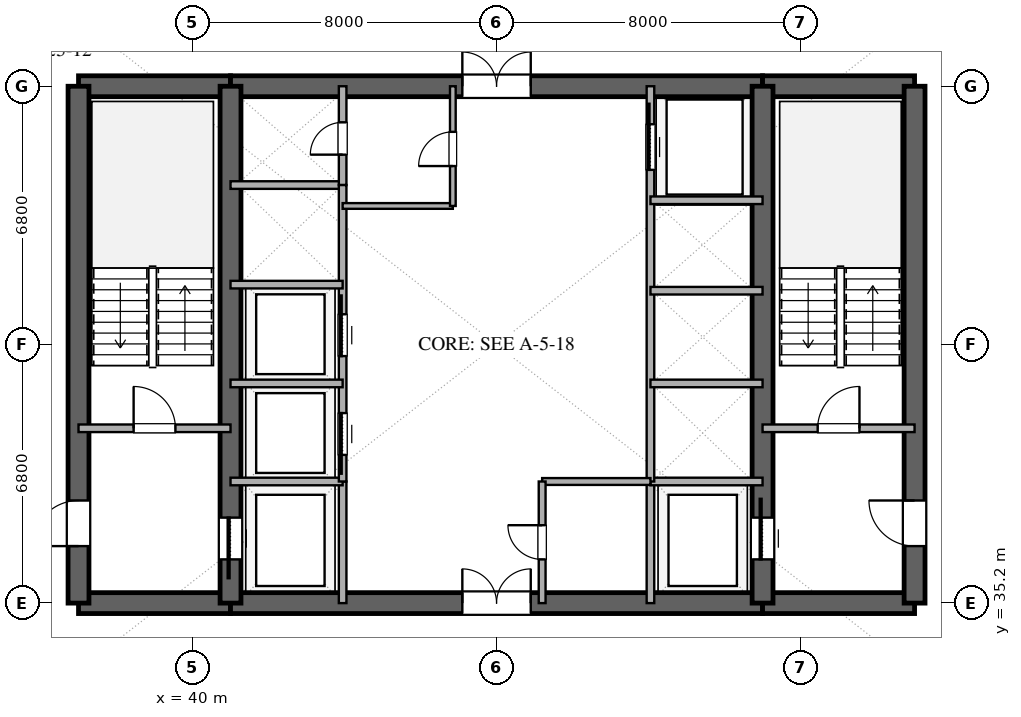
"""IFC4 building model, lengths in metres.
Left out: names, types, materials, properties, quantities, classifications, styles, units other than length and angle.
Written with IfcOpenShell. Run it as: python <this file> out.ifc"""

import sys

from ifc_helpers import new_model, si_unit, direction, frame, frame_2d, origin, place, context, subcontext, project, spatial, rectangle, extrude, element, fill, save


model = new_model("IFC4")
c1 = context("Model", 3, precision=1e-05, world=origin(), true_north=direction((0.0, 1.0)))
c2 = subcontext(c1, "Body", "Model", "MODEL_VIEW")
j1 = project(units=[si_unit("LENGTHUNIT", "METRE"), si_unit("PLANEANGLEUNIT", "RADIAN")], contexts=[c1])
p1 = place(None, origin())
s1 = spatial("IfcSite", under=j1, at=p1, CompositionType="ELEMENT")
p2 = place(p1, origin())
s2 = spatial("IfcBuilding", under=s1, at=p2, CompositionType="ELEMENT")
p3 = place(p2, frame((0.0, 0.0, 102.0)))
s3 = spatial("IfcBuildingStorey", under=s2, at=p3, CompositionType="ELEMENT", Elevation=102.0)
p4 = place(p3, frame((37.0, 35.2, 0.0), z_axis=(0.0, 0.0, 1.0), x_axis=(1.0, 0.0, 0.0)))
e1 = element("IfcWall", 1, at=p4, inside=s3, PredefinedType="SHEAR", context=c2, shape_type="SweptSolid", body=[
    extrude(rectangle(XDim=4.0, YDim=0.55, at=frame_2d((2.0, 0.0))), origin(), (0.0, 0.0, 1.0), 3.38),
])
p5 = place(p3, frame((41.0, 35.2, 0.0), z_axis=(0.0, 0.0, 1.0), x_axis=(1.0, 0.0, 0.0)))
e2 = element("IfcWall", 2, at=p5, inside=s3, PredefinedType="SHEAR", context=c2, shape_type="SweptSolid", body=[
    extrude(rectangle(XDim=14.0, YDim=0.55, at=frame_2d((7.0, 0.0))), origin(), (0.0, 0.0, 1.0), 3.38),
])
p6 = place(p5, frame((6.1, 0.0, 0.0)))
e3 = element("IfcOpeningElement", 3, at=p6, cuts=e2, PredefinedType="OPENING", context=c2, shape_type="SweptSolid", body=[
    extrude(rectangle(XDim=1.8, YDim=2.25, at=frame_2d((0.9, 1.125))), frame((0.0, 0.285, 0.0), z_axis=(0.0, -1.0, 0.0), x_axis=(1.0, 0.0, 0.0)), (0.0, 0.0, 1.0), 0.57),
])
for number, where, z_axis, x_axis in (
    (4, (55.0, 35.2, 0.0), (0.0, 0.0, 1.0), (1.0, 0.0, 0.0)),
    (5, (37.0, 48.8, 0.0), (0.0, 0.0, 1.0), (1.0, 0.0, 0.0)),
):
    element("IfcWall", number, at=place(p3, frame(where, z_axis=z_axis, x_axis=x_axis)), inside=s3, PredefinedType="SHEAR", context=c2, shape_type="SweptSolid", body=[
        extrude(rectangle(XDim=4.0, YDim=0.55, at=frame_2d((2.0, 0.0))), origin(), (0.0, 0.0, 1.0), 3.38),
    ])
p7 = place(p3, frame((41.0, 48.8, 0.0), z_axis=(0.0, 0.0, 1.0), x_axis=(1.0, 0.0, 0.0)))
e6 = element("IfcWall", 6, at=p7, inside=s3, PredefinedType="SHEAR", context=c2, shape_type="SweptSolid", body=[
    extrude(rectangle(XDim=14.0, YDim=0.55, at=frame_2d((7.0, 0.0))), origin(), (0.0, 0.0, 1.0), 3.38),
])
p8 = place(p7, frame((6.1, 0.0, 0.0)))
e7 = element("IfcOpeningElement", 7, at=p8, cuts=e6, PredefinedType="OPENING", context=c2, shape_type="SweptSolid", body=[
    extrude(rectangle(XDim=1.8, YDim=2.25, at=frame_2d((0.9, 1.125))), frame((0.0, 0.285, 0.0), z_axis=(0.0, -1.0, 0.0), x_axis=(1.0, 0.0, 0.0)), (0.0, 0.0, 1.0), 0.57),
])
p9 = place(p3, frame((55.0, 48.8, 0.0), z_axis=(0.0, 0.0, 1.0), x_axis=(1.0, 0.0, 0.0)))
e8 = element("IfcWall", 8, at=p9, inside=s3, PredefinedType="SHEAR", context=c2, shape_type="SweptSolid", body=[
    extrude(rectangle(XDim=4.0, YDim=0.55, at=frame_2d((2.0, 0.0))), origin(), (0.0, 0.0, 1.0), 3.38),
])
p10 = place(p3, frame((37.0, 35.2, 0.0), z_axis=(0.0, 0.0, 1.0), x_axis=(0.0, 1.0, 0.0)))
e9 = element("IfcWall", 9, at=p10, inside=s3, PredefinedType="SHEAR", context=c2, shape_type="SweptSolid", body=[
    extrude(rectangle(XDim=13.6, YDim=0.55, at=frame_2d((6.8, 0.0))), origin(), (0.0, 0.0, 1.0), 3.38),
])
p11 = place(p10, frame((1.5, 0.0, 0.0)))
e10 = element("IfcOpeningElement", 10, at=p11, cuts=e9, PredefinedType="OPENING", context=c2, shape_type="SweptSolid", body=[
    extrude(rectangle(XDim=1.2, YDim=2.15, at=frame_2d((0.6, 1.075))), frame((0.0, 0.285, 0.0), z_axis=(0.0, -1.0, 0.0), x_axis=(1.0, 0.0, 0.0)), (0.0, 0.0, 1.0), 0.57),
])
p12 = place(p3, frame((59.0, 35.2, 0.0), z_axis=(0.0, 0.0, 1.0), x_axis=(0.0, 1.0, 0.0)))
e11 = element("IfcWall", 11, at=p12, inside=s3, PredefinedType="SHEAR", context=c2, shape_type="SweptSolid", body=[
    extrude(rectangle(XDim=13.6, YDim=0.55, at=frame_2d((6.8, 0.0))), origin(), (0.0, 0.0, 1.0), 3.38),
])
p13 = place(p12, frame((1.5, 0.0, 0.0)))
e12 = element("IfcOpeningElement", 12, at=p13, cuts=e11, PredefinedType="OPENING", context=c2, shape_type="SweptSolid", body=[
    extrude(rectangle(XDim=1.2, YDim=2.15, at=frame_2d((0.6, 1.075))), frame((0.0, 0.285, 0.0), z_axis=(0.0, -1.0, 0.0), x_axis=(1.0, 0.0, 0.0)), (0.0, 0.0, 1.0), 0.57),
])
p14 = place(p3, frame((41.0, 35.2, 0.0), z_axis=(0.0, 0.0, 1.0), x_axis=(0.0, 1.0, 0.0)))
e13 = element("IfcWall", 13, at=p14, inside=s3, PredefinedType="SHEAR", context=c2, shape_type="SweptSolid", body=[
    extrude(rectangle(XDim=13.6, YDim=0.55, at=frame_2d((6.8, 0.0))), origin(), (0.0, 0.0, 1.0), 3.38),
])
p15 = place(p14, frame((1.15, 0.0, 0.0)))
e14 = element("IfcOpeningElement", 14, at=p15, cuts=e13, PredefinedType="OPENING", context=c2, shape_type="SweptSolid", body=[
    extrude(rectangle(XDim=1.1, YDim=2.2, at=frame_2d((0.55, 1.1))), frame((0.0, 0.285, 0.0), z_axis=(0.0, -1.0, 0.0), x_axis=(1.0, 0.0, 0.0)), (0.0, 0.0, 1.0), 0.57),
])
p16 = place(p3, frame((55.0, 35.2, 0.0), z_axis=(0.0, 0.0, 1.0), x_axis=(0.0, 1.0, 0.0)))
e15 = element("IfcWall", 15, at=p16, inside=s3, PredefinedType="SHEAR", context=c2, shape_type="SweptSolid", body=[
    extrude(rectangle(XDim=13.6, YDim=0.55, at=frame_2d((6.8, 0.0))), origin(), (0.0, 0.0, 1.0), 3.38),
])
p17 = place(p16, frame((1.15, 0.0, 0.0)))
e16 = element("IfcOpeningElement", 16, at=p17, cuts=e15, PredefinedType="OPENING", context=c2, shape_type="SweptSolid", body=[
    extrude(rectangle(XDim=1.1, YDim=2.2, at=frame_2d((0.55, 1.1))), frame((0.0, 0.285, 0.0), z_axis=(0.0, -1.0, 0.0), x_axis=(1.0, 0.0, 0.0)), (0.0, 0.0, 1.0), 0.57),
])
p18 = place(p3, frame((37.0, 39.8, 0.0), z_axis=(0.0, 0.0, 1.0), x_axis=(1.0, 0.0, 0.0)))
e17 = element("IfcWall", 17, at=p18, inside=s3, PredefinedType="SOLIDWALL", context=c2, shape_type="SweptSolid", body=[
    extrude(rectangle(XDim=4.0, YDim=0.2, at=frame_2d((2.0, 0.0))), origin(), (0.0, 0.0, 1.0), 2.74),
])
p19 = place(p18, frame((1.45, 0.0, 0.0)))
e18 = element("IfcOpeningElement", 18, at=p19, cuts=e17, PredefinedType="OPENING", context=c2, shape_type="SweptSolid", body=[
    extrude(rectangle(XDim=1.1, YDim=2.15, at=frame_2d((0.55, 1.075))), frame((0.0, 0.11, 0.0), z_axis=(0.0, -1.0, 0.0), x_axis=(1.0, 0.0, 0.0)), (0.0, 0.0, 1.0), 0.22),
])
p20 = place(p3, frame((55.0, 39.8, 0.0), z_axis=(0.0, 0.0, 1.0), x_axis=(1.0, 0.0, 0.0)))
e19 = element("IfcWall", 19, at=p20, inside=s3, PredefinedType="SOLIDWALL", context=c2, shape_type="SweptSolid", body=[
    extrude(rectangle(XDim=4.0, YDim=0.2, at=frame_2d((2.0, 0.0))), origin(), (0.0, 0.0, 1.0), 2.74),
])
p21 = place(p20, frame((1.45, 0.0, 0.0)))
e20 = element("IfcOpeningElement", 20, at=p21, cuts=e19, PredefinedType="OPENING", context=c2, shape_type="SweptSolid", body=[
    extrude(rectangle(XDim=1.1, YDim=2.15, at=frame_2d((0.55, 1.075))), frame((0.0, 0.11, 0.0), z_axis=(0.0, -1.0, 0.0), x_axis=(1.0, 0.0, 0.0)), (0.0, 0.0, 1.0), 0.22),
])
p22 = place(p3, frame((43.95, 35.2, 0.0), z_axis=(0.0, 0.0, 1.0), x_axis=(0.0, 1.0, 0.0)))
e21 = element("IfcWall", 21, at=p22, inside=s3, PredefinedType="SOLIDWALL", context=c2, shape_type="SweptSolid", body=[
    extrude(rectangle(XDim=3.2, YDim=0.2, at=frame_2d((1.6, 0.0))), origin(), (0.0, 0.0, 1.0), 2.74),
])
p23 = place(p3, frame((41.0, 38.4, 0.0), z_axis=(0.0, 0.0, 1.0), x_axis=(1.0, 0.0, 0.0)))
e22 = element("IfcWall", 22, at=p23, inside=s3, PredefinedType="SOLIDWALL", context=c2, shape_type="SweptSolid", body=[
    extrude(rectangle(XDim=2.95, YDim=0.2, at=frame_2d((1.475, 0.0))), origin(), (0.0, 0.0, 1.0), 2.74),
])
p24 = place(p3, frame((52.05, 35.2, 0.0), z_axis=(0.0, 0.0, 1.0), x_axis=(0.0, 1.0, 0.0)))
e23 = element("IfcWall", 23, at=p24, inside=s3, PredefinedType="SOLIDWALL", context=c2, shape_type="SweptSolid", body=[
    extrude(rectangle(XDim=3.2, YDim=0.2, at=frame_2d((1.6, 0.0))), origin(), (0.0, 0.0, 1.0), 2.74),
])
for number, where, z_axis, x_axis in (
    (24, (52.05, 38.4, 0.0), (0.0, 0.0, 1.0), (1.0, 0.0, 0.0)),
    (25, (41.0, 46.2, 0.0), (0.0, 0.0, 1.0), (1.0, 0.0, 0.0)),
):
    element("IfcWall", number, at=place(p3, frame(where, z_axis=z_axis, x_axis=x_axis)), inside=s3, PredefinedType="SOLIDWALL", context=c2, shape_type="SweptSolid", body=[
        extrude(rectangle(XDim=2.95, YDim=0.2, at=frame_2d((1.475, 0.0))), origin(), (0.0, 0.0, 1.0), 2.74),
    ])
p25 = place(p3, frame((43.95, 46.2, 0.0), z_axis=(0.0, 0.0, 1.0), x_axis=(0.0, 1.0, 0.0)))
e26 = element("IfcWall", 26, at=p25, inside=s3, PredefinedType="SOLIDWALL", context=c2, shape_type="SweptSolid", body=[
    extrude(rectangle(XDim=2.6, YDim=0.2, at=frame_2d((1.3, 0.0))), origin(), (0.0, 0.0, 1.0), 2.74),
])
p26 = place(p25, frame((0.8, 0.0, 0.0)))
e27 = element("IfcOpeningElement", 27, at=p26, cuts=e26, PredefinedType="OPENING", context=c2, shape_type="SweptSolid", body=[
    extrude(rectangle(XDim=0.85, YDim=2.15, at=frame_2d((0.425, 1.075))), frame((0.0, 0.11, 0.0), z_axis=(0.0, -1.0, 0.0), x_axis=(1.0, 0.0, 0.0)), (0.0, 0.0, 1.0), 0.22),
])
p27 = place(p3, frame((43.95, 38.4, 0.0), z_axis=(0.0, 0.0, 1.0), x_axis=(0.0, 1.0, 0.0)))
e28 = element("IfcWall", 28, at=p27, inside=s3, PredefinedType="SOLIDWALL", context=c2, shape_type="SweptSolid", body=[
    extrude(rectangle(XDim=7.8, YDim=0.2, at=frame_2d((3.9, 0.0))), origin(), (0.0, 0.0, 1.0), 2.74),
])
p28 = place(p27, frame((0.7, 0.0, 0.0)))
e29 = element("IfcOpeningElement", 29, at=p28, cuts=e28, PredefinedType="OPENING", context=c2, shape_type="SweptSolid", body=[
    extrude(rectangle(XDim=1.1, YDim=2.2, at=frame_2d((0.55, 1.1))), frame((0.0, 0.11, 0.0), z_axis=(0.0, -1.0, 0.0), x_axis=(1.0, 0.0, 0.0)), (0.0, 0.0, 1.0), 0.22),
])
p29 = place(p27, frame((3.3, 0.0, 0.0)))
e30 = element("IfcOpeningElement", 30, at=p29, cuts=e28, PredefinedType="OPENING", context=c2, shape_type="SweptSolid", body=[
    extrude(rectangle(XDim=1.1, YDim=2.2, at=frame_2d((0.55, 1.1))), frame((0.0, 0.11, 0.0), z_axis=(0.0, -1.0, 0.0), x_axis=(1.0, 0.0, 0.0)), (0.0, 0.0, 1.0), 0.22),
])
for number, where, z_axis, x_axis in (
    (31, (41.0, 40.98, 0.0), (0.0, 0.0, 1.0), (1.0, 0.0, 0.0)),
    (32, (41.0, 43.58, 0.0), (0.0, 0.0, 1.0), (1.0, 0.0, 0.0)),
):
    element("IfcWall", number, at=place(p3, frame(where, z_axis=z_axis, x_axis=x_axis)), inside=s3, PredefinedType="SOLIDWALL", context=c2, shape_type="SweptSolid", body=[
        extrude(rectangle(XDim=2.95, YDim=0.2, at=frame_2d((1.475, 0.0))), origin(), (0.0, 0.0, 1.0), 2.74),
    ])
p30 = place(p3, frame((52.05, 38.4, 0.0), z_axis=(0.0, 0.0, 1.0), x_axis=(0.0, 1.0, 0.0)))
e33 = element("IfcWall", 33, at=p30, inside=s3, PredefinedType="SOLIDWALL", context=c2, shape_type="SweptSolid", body=[
    extrude(rectangle(XDim=10.4, YDim=0.2, at=frame_2d((5.2, 0.0))), origin(), (0.0, 0.0, 1.0), 2.74),
])
p31 = place(p30, frame((8.2, 0.0, 0.0)))
e34 = element("IfcOpeningElement", 34, at=p31, cuts=e33, PredefinedType="OPENING", context=c2, shape_type="SweptSolid", body=[
    extrude(rectangle(XDim=1.2, YDim=2.2, at=frame_2d((0.6, 1.1))), frame((0.0, 0.11, 0.0), z_axis=(0.0, -1.0, 0.0), x_axis=(1.0, 0.0, 0.0)), (0.0, 0.0, 1.0), 0.22),
])
for number, where, z_axis, x_axis in (
    (35, (52.05, 40.98, 0.0), (0.0, 0.0, 1.0), (1.0, 0.0, 0.0)),
    (36, (52.05, 43.42, 0.0), (0.0, 0.0, 1.0), (1.0, 0.0, 0.0)),
    (37, (52.05, 45.8, 0.0), (0.0, 0.0, 1.0), (1.0, 0.0, 0.0)),
):
    element("IfcWall", number, at=place(p3, frame(where, z_axis=z_axis, x_axis=x_axis)), inside=s3, PredefinedType="SOLIDWALL", context=c2, shape_type="SweptSolid", body=[
        extrude(rectangle(XDim=2.95, YDim=0.2, at=frame_2d((1.475, 0.0))), origin(), (0.0, 0.0, 1.0), 2.74),
    ])
p32 = place(p3, frame((43.95, 45.65, 0.0), z_axis=(0.0, 0.0, 1.0), x_axis=(1.0, 0.0, 0.0)))
e38 = element("IfcWall", 38, at=p32, inside=s3, PredefinedType="PARTITIONING", context=c2, shape_type="SweptSolid", body=[
    extrude(rectangle(XDim=2.9, YDim=0.15, at=frame_2d((1.45, 0.0))), origin(), (0.0, 0.0, 1.0), 2.74),
])
p33 = place(p3, frame((46.85, 45.65, 0.0), z_axis=(0.0, 0.0, 1.0), x_axis=(0.0, 1.0, 0.0)))
e39 = element("IfcWall", 39, at=p33, inside=s3, PredefinedType="PARTITIONING", context=c2, shape_type="SweptSolid", body=[
    extrude(rectangle(XDim=3.15, YDim=0.15, at=frame_2d((1.575, 0.0))), origin(), (0.0, 0.0, 1.0), 2.74),
])
p34 = place(p33, frame((1.05, 0.0, 0.0)))
e40 = element("IfcOpeningElement", 40, at=p34, cuts=e39, PredefinedType="OPENING", context=c2, shape_type="SweptSolid", body=[
    extrude(rectangle(XDim=0.9, YDim=2.15, at=frame_2d((0.45, 1.075))), frame((0.0, 0.085, 0.0), z_axis=(0.0, -1.0, 0.0), x_axis=(1.0, 0.0, 0.0)), (0.0, 0.0, 1.0), 0.17),
])
p35 = place(p3, frame((49.2, 38.4, 0.0), z_axis=(0.0, 0.0, 1.0), x_axis=(1.0, 0.0, 0.0)))
e41 = element("IfcWall", 41, at=p35, inside=s3, PredefinedType="PLUMBINGWALL", context=c2, shape_type="SweptSolid", body=[
    extrude(rectangle(XDim=2.85, YDim=0.18, at=frame_2d((1.425, 0.0))), origin(), (0.0, 0.0, 1.0), 2.74),
])
p36 = place(p3, frame((49.2, 35.2, 0.0), z_axis=(0.0, 0.0, 1.0), x_axis=(0.0, 1.0, 0.0)))
e42 = element("IfcWall", 42, at=p36, inside=s3, PredefinedType="PLUMBINGWALL", context=c2, shape_type="SweptSolid", body=[
    extrude(rectangle(XDim=3.2, YDim=0.18, at=frame_2d((1.6, 0.0))), origin(), (0.0, 0.0, 1.0), 2.74),
])
p37 = place(p36, frame((1.15, 0.0, 0.0)))
e43 = element("IfcOpeningElement", 43, at=p37, cuts=e42, PredefinedType="OPENING", context=c2, shape_type="SweptSolid", body=[
    extrude(rectangle(XDim=0.9, YDim=2.1, at=frame_2d((0.45, 1.05))), frame((0.0, 0.1, 0.0), z_axis=(0.0, -1.0, 0.0), x_axis=(1.0, 0.0, 0.0)), (0.0, 0.0, 1.0), 0.2),
])
p38 = place(p15, origin())
e44 = element("IfcDoor", 44, at=p38, inside=s3, OperationType="SLIDING_TO_LEFT", PredefinedType="DOOR", context=c2, shape_type="SweptSolid", body=[
    extrude(rectangle(XDim=1.1, YDim=2.2, at=frame_2d((0.55, 1.1))), frame((0.0, 0.025, 0.0), z_axis=(0.0, -1.0, 0.0), x_axis=(1.0, 0.0, 0.0)), (0.0, 0.0, 1.0), 0.05),
])
fill(e14, e44)
p39 = place(p17, origin())
e45 = element("IfcDoor", 45, at=p39, inside=s3, OperationType="SLIDING_TO_RIGHT", PredefinedType="DOOR", context=c2, shape_type="SweptSolid", body=[
    extrude(rectangle(XDim=1.1, YDim=2.2, at=frame_2d((0.55, 1.1))), frame((0.0, 0.025, 0.0), z_axis=(0.0, -1.0, 0.0), x_axis=(1.0, 0.0, 0.0)), (0.0, 0.0, 1.0), 0.05),
])
fill(e16, e45)
p40 = place(p11, origin())
e46 = element("IfcDoor", 46, at=p40, inside=s3, OperationType="SINGLE_SWING_LEFT", PredefinedType="DOOR", context=c2, shape_type="SweptSolid", body=[
    extrude(rectangle(XDim=1.2, YDim=2.15, at=frame_2d((0.6, 1.075))), frame((0.0, 0.025, 0.0), z_axis=(0.0, -1.0, 0.0), x_axis=(1.0, 0.0, 0.0)), (0.0, 0.0, 1.0), 0.05),
])
fill(e10, e46)
p41 = place(p13, origin())
e47 = element("IfcDoor", 47, at=p41, inside=s3, OperationType="SINGLE_SWING_RIGHT", PredefinedType="DOOR", context=c2, shape_type="SweptSolid", body=[
    extrude(rectangle(XDim=1.2, YDim=2.15, at=frame_2d((0.6, 1.075))), frame((0.0, 0.025, 0.0), z_axis=(0.0, -1.0, 0.0), x_axis=(1.0, 0.0, 0.0)), (0.0, 0.0, 1.0), 0.05),
])
fill(e12, e47)
p42 = place(p6, origin())
e48 = element("IfcDoor", 48, at=p42, inside=s3, OperationType="DOUBLE_DOOR_SINGLE_SWING", PredefinedType="DOOR", context=c2, shape_type="SweptSolid", body=[
    extrude(rectangle(XDim=1.8, YDim=2.25, at=frame_2d((0.9, 1.125))), frame((0.0, 0.025, 0.0), z_axis=(0.0, -1.0, 0.0), x_axis=(1.0, 0.0, 0.0)), (0.0, 0.0, 1.0), 0.05),
])
fill(e3, e48)
p43 = place(p8, origin())
e49 = element("IfcDoor", 49, at=p43, inside=s3, OperationType="DOUBLE_DOOR_SINGLE_SWING", PredefinedType="DOOR", context=c2, shape_type="SweptSolid", body=[
    extrude(rectangle(XDim=1.8, YDim=2.25, at=frame_2d((0.9, 1.125))), frame((0.0, 0.025, 0.0), z_axis=(0.0, -1.0, 0.0), x_axis=(1.0, 0.0, 0.0)), (0.0, 0.0, 1.0), 0.05),
])
fill(e7, e49)
p44 = place(p19, origin())
e50 = element("IfcDoor", 50, at=p44, inside=s3, OperationType="SINGLE_SWING_LEFT", PredefinedType="DOOR", context=c2, shape_type="SweptSolid", body=[
    extrude(rectangle(XDim=1.1, YDim=2.15, at=frame_2d((0.55, 1.075))), frame((0.0, 0.025, 0.0), z_axis=(0.0, -1.0, 0.0), x_axis=(1.0, 0.0, 0.0)), (0.0, 0.0, 1.0), 0.05),
])
fill(e18, e50)
p45 = place(p21, origin())
e51 = element("IfcDoor", 51, at=p45, inside=s3, OperationType="SINGLE_SWING_RIGHT", PredefinedType="DOOR", context=c2, shape_type="SweptSolid", body=[
    extrude(rectangle(XDim=1.1, YDim=2.15, at=frame_2d((0.55, 1.075))), frame((0.0, 0.025, 0.0), z_axis=(0.0, -1.0, 0.0), x_axis=(1.0, 0.0, 0.0)), (0.0, 0.0, 1.0), 0.05),
])
fill(e20, e51)
p46 = place(p26, origin())
e52 = element("IfcDoor", 52, at=p46, inside=s3, OperationType="SINGLE_SWING_LEFT", PredefinedType="DOOR", context=c2, shape_type="SweptSolid", body=[
    extrude(rectangle(XDim=0.85, YDim=2.15, at=frame_2d((0.425, 1.075))), frame((0.0, 0.025, 0.0), z_axis=(0.0, -1.0, 0.0), x_axis=(1.0, 0.0, 0.0)), (0.0, 0.0, 1.0), 0.05),
])
fill(e27, e52)
p47 = place(p28, origin())
e53 = element("IfcDoor", 53, at=p47, inside=s3, OperationType="SLIDING_TO_LEFT", PredefinedType="DOOR", context=c2, shape_type="SweptSolid", body=[
    extrude(rectangle(XDim=1.1, YDim=2.2, at=frame_2d((0.55, 1.1))), frame((0.0, 0.025, 0.0), z_axis=(0.0, -1.0, 0.0), x_axis=(1.0, 0.0, 0.0)), (0.0, 0.0, 1.0), 0.05),
])
fill(e29, e53)
p48 = place(p29, origin())
e54 = element("IfcDoor", 54, at=p48, inside=s3, OperationType="SLIDING_TO_RIGHT", PredefinedType="DOOR", context=c2, shape_type="SweptSolid", body=[
    extrude(rectangle(XDim=1.1, YDim=2.2, at=frame_2d((0.55, 1.1))), frame((0.0, 0.025, 0.0), z_axis=(0.0, -1.0, 0.0), x_axis=(1.0, 0.0, 0.0)), (0.0, 0.0, 1.0), 0.05),
])
fill(e30, e54)
p49 = place(p31, origin())
e55 = element("IfcDoor", 55, at=p49, inside=s3, OperationType="SLIDING_TO_RIGHT", PredefinedType="DOOR", context=c2, shape_type="SweptSolid", body=[
    extrude(rectangle(XDim=1.2, YDim=2.2, at=frame_2d((0.6, 1.1))), frame((0.0, 0.025, 0.0), z_axis=(0.0, -1.0, 0.0), x_axis=(1.0, 0.0, 0.0)), (0.0, 0.0, 1.0), 0.05),
])
fill(e34, e55)
p50 = place(p34, origin())
e56 = element("IfcDoor", 56, at=p50, inside=s3, OperationType="SINGLE_SWING_LEFT", PredefinedType="DOOR", context=c2, shape_type="SweptSolid", body=[
    extrude(rectangle(XDim=0.9, YDim=2.15, at=frame_2d((0.45, 1.075))), frame((0.0, 0.025, 0.0), z_axis=(0.0, -1.0, 0.0), x_axis=(1.0, 0.0, 0.0)), (0.0, 0.0, 1.0), 0.05),
])
fill(e40, e56)
p51 = place(p37, origin())
e57 = element("IfcDoor", 57, at=p51, inside=s3, OperationType="SINGLE_SWING_RIGHT", PredefinedType="DOOR", context=c2, shape_type="SweptSolid", body=[
    extrude(rectangle(XDim=0.9, YDim=2.1, at=frame_2d((0.45, 1.05))), frame((0.0, 0.025, 0.0), z_axis=(0.0, -1.0, 0.0), x_axis=(1.0, 0.0, 0.0)), (0.0, 0.0, 1.0), 0.05),
])
fill(e43, e57)
save(model, sys.argv[1])
